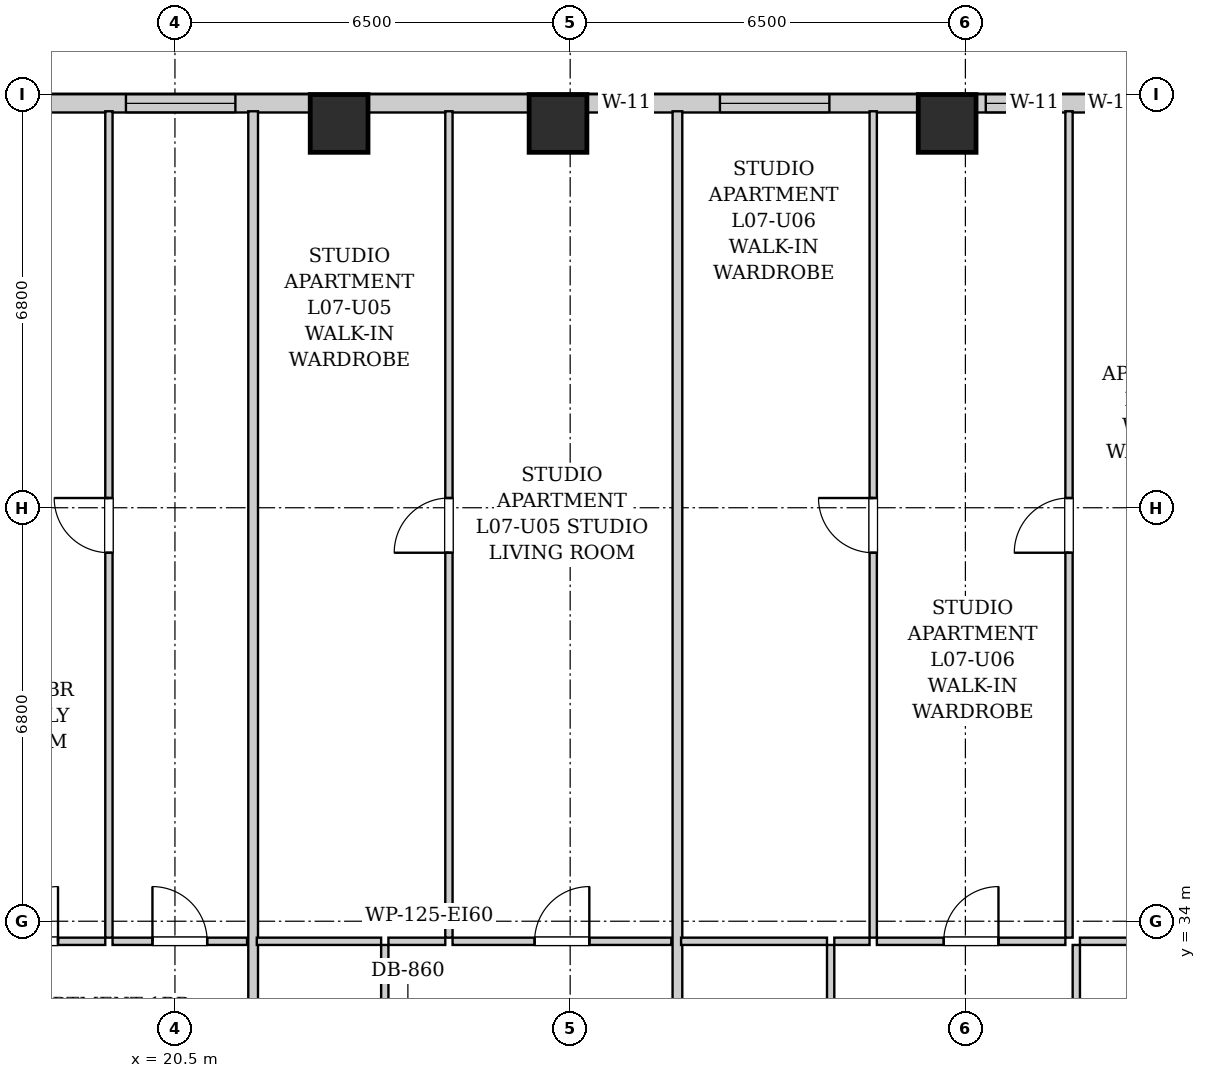
"""IFC4 building model, lengths in metres.
Left out: names, types, materials, properties, quantities, classifications, styles, units other than length and angle.
Written with IfcOpenShell. Run it as: python <this file> out.ifc"""

import sys

from ifc_helpers import new_model, si_unit, direction, frame, frame_2d, origin, origin_2d, place, context, subcontext, project, spatial, rectangle, extrude, element, fill, save


model = new_model("IFC4")
c1 = context("Model", 3, precision=1e-05, world=origin(), true_north=direction((0.0, 1.0)))
c2 = subcontext(c1, "Body", "Model", "MODEL_VIEW")
j1 = project(units=[si_unit("LENGTHUNIT", "METRE"), si_unit("PLANEANGLEUNIT", "RADIAN")], contexts=[c1])
p1 = place(None, origin())
s1 = spatial("IfcSite", under=j1, at=p1, CompositionType="ELEMENT")
p2 = place(p1, origin())
s2 = spatial("IfcBuilding", under=s1, at=p2, CompositionType="ELEMENT")
p3 = place(p2, frame((0.0, 0.0, 32.2)))
s3 = spatial("IfcBuildingStorey", under=s2, at=p3, CompositionType="ELEMENT", Elevation=32.2)
for number, where, z_axis, x_axis in (
    (1, (23.2, 47.12, 0.0), (0.0, 0.0, 1.0), (1.0, 0.0, 0.0)),
    (2, (26.8, 47.12, 0.0), (0.0, 0.0, 1.0), (1.0, 0.0, 0.0)),
    (3, (33.2, 47.12, 0.0), (0.0, 0.0, 1.0), (1.0, 0.0, 0.0)),
):
    element("IfcColumn", number, at=place(p3, frame(where, z_axis=z_axis, x_axis=x_axis)), inside=s3, PredefinedType="COLUMN", context=c2, shape_type="SweptSolid", body=[
        extrude(rectangle(XDim=0.95, YDim=0.95, at=origin_2d()), origin(), (0.0, 0.0, 1.0), 3.2),
    ])
p4 = place(p3, frame((10.0, 47.45, 0.0), z_axis=(0.0, 0.0, 1.0), x_axis=(1.0, 0.0, 0.0)))
e4 = element("IfcWall", 4, at=p4, inside=s3, PredefinedType="SOLIDWALL", context=c2, shape_type="SweptSolid", body=[
    extrude(rectangle(XDim=26.9, YDim=0.3, at=frame_2d((13.45, 0.0))), origin(), (0.0, 0.0, 1.0), 1.975),
])
p5 = place(p4, frame((5.815, 0.0, 0.55)))
e5 = element("IfcOpeningElement", 5, at=p5, cuts=e4, PredefinedType="OPENING", context=c2, shape_type="SweptSolid", body=[
    extrude(rectangle(XDim=1.35, YDim=1.2, at=frame_2d((0.675, 0.6))), frame((0.0, 0.16, 0.0), z_axis=(0.0, -1.0, 0.0), x_axis=(1.0, 0.0, 0.0)), (0.0, 0.0, 1.0), 0.32),
])
p6 = place(p4, frame((9.694, 0.0, 0.55)))
e6 = element("IfcOpeningElement", 6, at=p6, cuts=e4, PredefinedType="OPENING", context=c2, shape_type="SweptSolid", body=[
    extrude(rectangle(XDim=1.8, YDim=1.2, at=frame_2d((0.9, 0.6))), frame((0.0, 0.16, 0.0), z_axis=(0.0, -1.0, 0.0), x_axis=(1.0, 0.0, 0.0)), (0.0, 0.0, 1.0), 0.32),
])
p7 = place(p4, frame((17.5, 0.0, 0.55)))
e7 = element("IfcOpeningElement", 7, at=p7, cuts=e4, PredefinedType="OPENING", context=c2, shape_type="SweptSolid", body=[
    extrude(rectangle(XDim=0.85, YDim=1.2, at=frame_2d((0.425, 0.6))), frame((0.0, 0.16, 0.0), z_axis=(0.0, -1.0, 0.0), x_axis=(1.0, 0.0, 0.0)), (0.0, 0.0, 1.0), 0.32),
])
p8 = place(p4, frame((19.463, 0.0, 0.55)))
e8 = element("IfcOpeningElement", 8, at=p8, cuts=e4, PredefinedType="OPENING", context=c2, shape_type="SweptSolid", body=[
    extrude(rectangle(XDim=1.8, YDim=1.2, at=frame_2d((0.9, 0.6))), frame((0.0, 0.16, 0.0), z_axis=(0.0, -1.0, 0.0), x_axis=(1.0, 0.0, 0.0)), (0.0, 0.0, 1.0), 0.32),
])
p9 = place(p4, frame((23.835, 0.0, 0.55)))
e9 = element("IfcOpeningElement", 9, at=p9, cuts=e4, PredefinedType="OPENING", context=c2, shape_type="SweptSolid", body=[
    extrude(rectangle(XDim=0.85, YDim=1.2, at=frame_2d((0.425, 0.6))), frame((0.0, 0.16, 0.0), z_axis=(0.0, -1.0, 0.0), x_axis=(1.0, 0.0, 0.0)), (0.0, 0.0, 1.0), 0.32),
])
p10 = place(p4, frame((25.498, 0.0, 0.55)))
e10 = element("IfcOpeningElement", 10, at=p10, cuts=e4, PredefinedType="OPENING", context=c2, shape_type="SweptSolid", body=[
    extrude(rectangle(XDim=0.85, YDim=1.2, at=frame_2d((0.425, 0.6))), frame((0.0, 0.16, 0.0), z_axis=(0.0, -1.0, 0.0), x_axis=(1.0, 0.0, 0.0)), (0.0, 0.0, 1.0), 0.32),
])
p11 = place(p3, frame((16.9, 33.67, 0.0), z_axis=(0.0, 0.0, 1.0), x_axis=(1.0, 0.0, 0.0)))
e11 = element("IfcWall", 11, at=p11, inside=s3, PredefinedType="PARTITIONING", context=c2, shape_type="SweptSolid", body=[
    extrude(rectangle(XDim=2.454, YDim=0.12, at=frame_2d((1.227, 0.0))), origin(), (0.0, 0.0, 1.0), 2.94),
])
p12 = place(p11, frame((0.777, 0.0, 0.0)))
e12 = element("IfcOpeningElement", 12, at=p12, cuts=e11, PredefinedType="OPENING", context=c2, shape_type="SweptSolid", body=[
    extrude(rectangle(XDim=0.9, YDim=2.05, at=frame_2d((0.45, 1.025))), frame((0.0, 0.07, 0.0), z_axis=(0.0, -1.0, 0.0), x_axis=(1.0, 0.0, 0.0)), (0.0, 0.0, 1.0), 0.14),
])
p13 = place(p3, frame((19.474, 33.67, 0.0), z_axis=(0.0, 0.0, 1.0), x_axis=(1.0, 0.0, 0.0)))
e13 = element("IfcWall", 13, at=p13, inside=s3, PredefinedType="PARTITIONING", context=c2, shape_type="SweptSolid", body=[
    extrude(rectangle(XDim=2.212, YDim=0.12, at=frame_2d((1.106, 0.0))), origin(), (0.0, 0.0, 1.0), 2.94),
])
p14 = place(p13, frame((0.656, 0.0, 0.0)))
e14 = element("IfcOpeningElement", 14, at=p14, cuts=e13, PredefinedType="OPENING", context=c2, shape_type="SweptSolid", body=[
    extrude(rectangle(XDim=0.9, YDim=2.05, at=frame_2d((0.45, 1.025))), frame((0.0, 0.07, 0.0), z_axis=(0.0, -1.0, 0.0), x_axis=(1.0, 0.0, 0.0)), (0.0, 0.0, 1.0), 0.14),
])
p15 = place(p3, frame((19.414, 33.73, 0.0), z_axis=(0.0, 0.0, 1.0), x_axis=(0.0, 1.0, 0.0)))
e15 = element("IfcWall", 15, at=p15, inside=s3, PredefinedType="PARTITIONING", context=c2, shape_type="SweptSolid", body=[
    extrude(rectangle(XDim=13.59, YDim=0.12, at=frame_2d((6.795, 0.0))), origin(), (0.0, 0.0, 1.0), 2.94),
])
p16 = place(p15, frame((6.33, 0.0, 0.0)))
e16 = element("IfcOpeningElement", 16, at=p16, cuts=e15, PredefinedType="OPENING", context=c2, shape_type="SweptSolid", body=[
    extrude(rectangle(XDim=0.9, YDim=2.05, at=frame_2d((0.45, 1.025))), frame((0.0, 0.07, 0.0), z_axis=(0.0, -1.0, 0.0), x_axis=(1.0, 0.0, 0.0)), (0.0, 0.0, 1.0), 0.14),
])
p17 = place(p3, frame((21.786, 30.76, 0.0), z_axis=(0.0, 0.0, 1.0), x_axis=(0.0, 1.0, 0.0)))
e17 = element("IfcWall", 17, at=p17, inside=s3, PredefinedType="PARTITIONING", context=c2, shape_type="SweptSolid", body=[
    extrude(rectangle(XDim=16.56, YDim=0.16, at=frame_2d((8.28, 0.0))), origin(), (0.0, 0.0, 1.0), 2.94),
])
p18 = place(p3, frame((23.951, 30.76, 0.0), z_axis=(0.0, 0.0, 1.0), x_axis=(0.0, 1.0, 0.0)))
e18 = element("IfcWall", 18, at=p18, inside=s3, PredefinedType="PARTITIONING", context=c2, shape_type="SweptSolid", body=[
    extrude(rectangle(XDim=2.85, YDim=0.12, at=frame_2d((1.425, 0.0))), origin(), (0.0, 0.0, 1.0), 2.94),
])
p19 = place(p18, frame((0.995, 0.0, 0.0)))
e19 = element("IfcOpeningElement", 19, at=p19, cuts=e18, PredefinedType="OPENING", context=c2, shape_type="SweptSolid", body=[
    extrude(rectangle(XDim=0.86, YDim=2.05, at=frame_2d((0.43, 1.025))), frame((0.0, 0.07, 0.0), z_axis=(0.0, -1.0, 0.0), x_axis=(1.0, 0.0, 0.0)), (0.0, 0.0, 1.0), 0.14),
])
p20 = place(p3, frame((21.846, 33.67, 0.0), z_axis=(0.0, 0.0, 1.0), x_axis=(1.0, 0.0, 0.0)))
e20 = element("IfcWall", 20, at=p20, inside=s3, PredefinedType="PARTITIONING", context=c2, shape_type="SweptSolid", body=[
    extrude(rectangle(XDim=2.045, YDim=0.12, at=frame_2d((1.022, 0.0))), origin(), (0.0, 0.0, 1.0), 2.94),
])
p21 = place(p3, frame((24.011, 33.67, 0.0), z_axis=(0.0, 0.0, 1.0), x_axis=(1.0, 0.0, 0.0)))
e21 = element("IfcWall", 21, at=p21, inside=s3, PredefinedType="PARTITIONING", context=c2, shape_type="SweptSolid", body=[
    extrude(rectangle(XDim=0.935, YDim=0.12, at=frame_2d((0.468, 0.0))), origin(), (0.0, 0.0, 1.0), 2.94),
])
p22 = place(p3, frame((25.066, 33.67, 0.0), z_axis=(0.0, 0.0, 1.0), x_axis=(1.0, 0.0, 0.0)))
e22 = element("IfcWall", 22, at=p22, inside=s3, PredefinedType="PARTITIONING", context=c2, shape_type="SweptSolid", body=[
    extrude(rectangle(XDim=3.598, YDim=0.12, at=frame_2d((1.799, 0.0))), origin(), (0.0, 0.0, 1.0), 2.94),
])
p23 = place(p22, frame((1.349, 0.0, 0.0)))
e23 = element("IfcOpeningElement", 23, at=p23, cuts=e22, PredefinedType="OPENING", context=c2, shape_type="SweptSolid", body=[
    extrude(rectangle(XDim=0.9, YDim=2.05, at=frame_2d((0.45, 1.025))), frame((0.0, 0.07, 0.0), z_axis=(0.0, -1.0, 0.0), x_axis=(1.0, 0.0, 0.0)), (0.0, 0.0, 1.0), 0.14),
])
p24 = place(p3, frame((25.006, 33.73, 0.0), z_axis=(0.0, 0.0, 1.0), x_axis=(0.0, 1.0, 0.0)))
e24 = element("IfcWall", 24, at=p24, inside=s3, PredefinedType="PARTITIONING", context=c2, shape_type="SweptSolid", body=[
    extrude(rectangle(XDim=13.59, YDim=0.12, at=frame_2d((6.795, 0.0))), origin(), (0.0, 0.0, 1.0), 2.94),
])
p25 = place(p24, frame((6.33, 0.0, 0.0)))
e25 = element("IfcOpeningElement", 25, at=p25, cuts=e24, PredefinedType="OPENING", context=c2, shape_type="SweptSolid", body=[
    extrude(rectangle(XDim=0.9, YDim=2.05, at=frame_2d((0.45, 1.025))), frame((0.0, 0.07, 0.0), z_axis=(0.0, -1.0, 0.0), x_axis=(1.0, 0.0, 0.0)), (0.0, 0.0, 1.0), 0.14),
])
p26 = place(p3, frame((28.764, 30.76, 0.0), z_axis=(0.0, 0.0, 1.0), x_axis=(0.0, 1.0, 0.0)))
e26 = element("IfcWall", 26, at=p26, inside=s3, PredefinedType="PARTITIONING", context=c2, shape_type="SweptSolid", body=[
    extrude(rectangle(XDim=16.56, YDim=0.16, at=frame_2d((8.28, 0.0))), origin(), (0.0, 0.0, 1.0), 2.94),
])
p27 = place(p3, frame((31.284, 30.76, 0.0), z_axis=(0.0, 0.0, 1.0), x_axis=(0.0, 1.0, 0.0)))
e27 = element("IfcWall", 27, at=p27, inside=s3, PredefinedType="PARTITIONING", context=c2, shape_type="SweptSolid", body=[
    extrude(rectangle(XDim=2.85, YDim=0.12, at=frame_2d((1.425, 0.0))), origin(), (0.0, 0.0, 1.0), 2.94),
])
p28 = place(p27, frame((0.995, 0.0, 0.0)))
e28 = element("IfcOpeningElement", 28, at=p28, cuts=e27, PredefinedType="OPENING", context=c2, shape_type="SweptSolid", body=[
    extrude(rectangle(XDim=0.86, YDim=2.05, at=frame_2d((0.43, 1.025))), frame((0.0, 0.07, 0.0), z_axis=(0.0, -1.0, 0.0), x_axis=(1.0, 0.0, 0.0)), (0.0, 0.0, 1.0), 0.14),
])
p29 = place(p3, frame((28.824, 33.67, 0.0), z_axis=(0.0, 0.0, 1.0), x_axis=(1.0, 0.0, 0.0)))
e29 = element("IfcWall", 29, at=p29, inside=s3, PredefinedType="PARTITIONING", context=c2, shape_type="SweptSolid", body=[
    extrude(rectangle(XDim=2.4, YDim=0.12, at=frame_2d((1.2, 0.0))), origin(), (0.0, 0.0, 1.0), 2.94),
])
p30 = place(p3, frame((35.324, 30.76, 0.0), z_axis=(0.0, 0.0, 1.0), x_axis=(0.0, 1.0, 0.0)))
e30 = element("IfcWall", 30, at=p30, inside=s3, PredefinedType="PARTITIONING", context=c2, shape_type="SweptSolid", body=[
    extrude(rectangle(XDim=2.85, YDim=0.12, at=frame_2d((1.425, 0.0))), origin(), (0.0, 0.0, 1.0), 2.94),
])
p31 = place(p30, frame((0.975, 0.0, 0.0)))
e31 = element("IfcOpeningElement", 31, at=p31, cuts=e30, PredefinedType="OPENING", context=c2, shape_type="SweptSolid", body=[
    extrude(rectangle(XDim=0.9, YDim=2.05, at=frame_2d((0.45, 1.025))), frame((0.0, 0.07, 0.0), z_axis=(0.0, -1.0, 0.0), x_axis=(1.0, 0.0, 0.0)), (0.0, 0.0, 1.0), 0.14),
])
p32 = place(p3, frame((31.344, 33.67, 0.0), z_axis=(0.0, 0.0, 1.0), x_axis=(1.0, 0.0, 0.0)))
e32 = element("IfcWall", 32, at=p32, inside=s3, PredefinedType="PARTITIONING", context=c2, shape_type="SweptSolid", body=[
    extrude(rectangle(XDim=0.58, YDim=0.12, at=frame_2d((0.29, 0.0))), origin(), (0.0, 0.0, 1.0), 2.94),
])
p33 = place(p3, frame((32.044, 33.67, 0.0), z_axis=(0.0, 0.0, 1.0), x_axis=(1.0, 0.0, 0.0)))
e33 = element("IfcWall", 33, at=p33, inside=s3, PredefinedType="PARTITIONING", context=c2, shape_type="SweptSolid", body=[
    extrude(rectangle(XDim=3.1, YDim=0.12, at=frame_2d((1.55, 0.0))), origin(), (0.0, 0.0, 1.0), 2.94),
])
p34 = place(p33, frame((1.1, 0.0, 0.0)))
e34 = element("IfcOpeningElement", 34, at=p34, cuts=e33, PredefinedType="OPENING", context=c2, shape_type="SweptSolid", body=[
    extrude(rectangle(XDim=0.9, YDim=2.05, at=frame_2d((0.45, 1.025))), frame((0.0, 0.07, 0.0), z_axis=(0.0, -1.0, 0.0), x_axis=(1.0, 0.0, 0.0)), (0.0, 0.0, 1.0), 0.14),
])
p35 = place(p3, frame((35.384, 33.67, 0.0), z_axis=(0.0, 0.0, 1.0), x_axis=(1.0, 0.0, 0.0)))
e35 = element("IfcWall", 35, at=p35, inside=s3, PredefinedType="PARTITIONING", context=c2, shape_type="SweptSolid", body=[
    extrude(rectangle(XDim=2.98, YDim=0.12, at=frame_2d((1.49, 0.0))), origin(), (0.0, 0.0, 1.0), 2.94),
])
p36 = place(p35, frame((1.04, 0.0, 0.0)))
e36 = element("IfcOpeningElement", 36, at=p36, cuts=e35, PredefinedType="OPENING", context=c2, shape_type="SweptSolid", body=[
    extrude(rectangle(XDim=0.9, YDim=2.05, at=frame_2d((0.45, 1.025))), frame((0.0, 0.07, 0.0), z_axis=(0.0, -1.0, 0.0), x_axis=(1.0, 0.0, 0.0)), (0.0, 0.0, 1.0), 0.14),
])
p37 = place(p3, frame((31.984, 33.73, 0.0), z_axis=(0.0, 0.0, 1.0), x_axis=(0.0, 1.0, 0.0)))
e37 = element("IfcWall", 37, at=p37, inside=s3, PredefinedType="PARTITIONING", context=c2, shape_type="SweptSolid", body=[
    extrude(rectangle(XDim=13.59, YDim=0.12, at=frame_2d((6.795, 0.0))), origin(), (0.0, 0.0, 1.0), 2.94),
])
p38 = place(p37, frame((6.33, 0.0, 0.0)))
e38 = element("IfcOpeningElement", 38, at=p38, cuts=e37, PredefinedType="OPENING", context=c2, shape_type="SweptSolid", body=[
    extrude(rectangle(XDim=0.9, YDim=2.05, at=frame_2d((0.45, 1.025))), frame((0.0, 0.07, 0.0), z_axis=(0.0, -1.0, 0.0), x_axis=(1.0, 0.0, 0.0)), (0.0, 0.0, 1.0), 0.14),
])
p39 = place(p3, frame((35.204, 33.73, 0.0), z_axis=(0.0, 0.0, 1.0), x_axis=(0.0, 1.0, 0.0)))
e39 = element("IfcWall", 39, at=p39, inside=s3, PredefinedType="PARTITIONING", context=c2, shape_type="SweptSolid", body=[
    extrude(rectangle(XDim=13.59, YDim=0.12, at=frame_2d((6.795, 0.0))), origin(), (0.0, 0.0, 1.0), 2.94),
])
p40 = place(p39, frame((6.33, 0.0, 0.0)))
e40 = element("IfcOpeningElement", 40, at=p40, cuts=e39, PredefinedType="OPENING", context=c2, shape_type="SweptSolid", body=[
    extrude(rectangle(XDim=0.9, YDim=2.05, at=frame_2d((0.45, 1.025))), frame((0.0, 0.07, 0.0), z_axis=(0.0, -1.0, 0.0), x_axis=(1.0, 0.0, 0.0)), (0.0, 0.0, 1.0), 0.14),
])
p41 = place(p12, origin())
e41 = element("IfcDoor", 41, at=p41, inside=s3, OperationType="SINGLE_SWING_RIGHT", PredefinedType="DOOR", context=c2, shape_type="SweptSolid", body=[
    extrude(rectangle(XDim=0.9, YDim=2.05, at=frame_2d((0.45, 1.025))), frame((0.0, 0.025, 0.0), z_axis=(0.0, -1.0, 0.0), x_axis=(1.0, 0.0, 0.0)), (0.0, 0.0, 1.0), 0.05),
])
fill(e12, e41)
p42 = place(p14, origin())
e42 = element("IfcDoor", 42, at=p42, inside=s3, OperationType="SINGLE_SWING_LEFT", PredefinedType="DOOR", context=c2, shape_type="SweptSolid", body=[
    extrude(rectangle(XDim=0.9, YDim=2.05, at=frame_2d((0.45, 1.025))), frame((0.0, 0.025, 0.0), z_axis=(0.0, -1.0, 0.0), x_axis=(1.0, 0.0, 0.0)), (0.0, 0.0, 1.0), 0.05),
])
fill(e14, e42)
p43 = place(p16, origin())
e43 = element("IfcDoor", 43, at=p43, inside=s3, OperationType="SINGLE_SWING_RIGHT", PredefinedType="DOOR", context=c2, shape_type="SweptSolid", body=[
    extrude(rectangle(XDim=0.9, YDim=2.05, at=frame_2d((0.45, 1.025))), frame((0.0, 0.025, 0.0), z_axis=(0.0, -1.0, 0.0), x_axis=(1.0, 0.0, 0.0)), (0.0, 0.0, 1.0), 0.05),
])
fill(e16, e43)
p44 = place(p23, origin())
e44 = element("IfcDoor", 44, at=p44, inside=s3, OperationType="SINGLE_SWING_RIGHT", PredefinedType="DOOR", context=c2, shape_type="SweptSolid", body=[
    extrude(rectangle(XDim=0.9, YDim=2.05, at=frame_2d((0.45, 1.025))), frame((0.0, 0.025, 0.0), z_axis=(0.0, -1.0, 0.0), x_axis=(1.0, 0.0, 0.0)), (0.0, 0.0, 1.0), 0.05),
])
fill(e23, e44)
p45 = place(p25, origin())
e45 = element("IfcDoor", 45, at=p45, inside=s3, OperationType="SINGLE_SWING_LEFT", PredefinedType="DOOR", context=c2, shape_type="SweptSolid", body=[
    extrude(rectangle(XDim=0.9, YDim=2.05, at=frame_2d((0.45, 1.025))), frame((0.0, 0.025, 0.0), z_axis=(0.0, -1.0, 0.0), x_axis=(1.0, 0.0, 0.0)), (0.0, 0.0, 1.0), 0.05),
])
fill(e25, e45)
p46 = place(p34, origin())
e46 = element("IfcDoor", 46, at=p46, inside=s3, OperationType="SINGLE_SWING_RIGHT", PredefinedType="DOOR", context=c2, shape_type="SweptSolid", body=[
    extrude(rectangle(XDim=0.9, YDim=2.05, at=frame_2d((0.45, 1.025))), frame((0.0, 0.025, 0.0), z_axis=(0.0, -1.0, 0.0), x_axis=(1.0, 0.0, 0.0)), (0.0, 0.0, 1.0), 0.05),
])
fill(e34, e46)
p47 = place(p38, origin())
e47 = element("IfcDoor", 47, at=p47, inside=s3, OperationType="SINGLE_SWING_RIGHT", PredefinedType="DOOR", context=c2, shape_type="SweptSolid", body=[
    extrude(rectangle(XDim=0.9, YDim=2.05, at=frame_2d((0.45, 1.025))), frame((0.0, 0.025, 0.0), z_axis=(0.0, -1.0, 0.0), x_axis=(1.0, 0.0, 0.0)), (0.0, 0.0, 1.0), 0.05),
])
fill(e38, e47)
p48 = place(p40, origin())
e48 = element("IfcDoor", 48, at=p48, inside=s3, OperationType="SINGLE_SWING_LEFT", PredefinedType="DOOR", context=c2, shape_type="SweptSolid", body=[
    extrude(rectangle(XDim=0.9, YDim=2.05, at=frame_2d((0.45, 1.025))), frame((0.0, 0.025, 0.0), z_axis=(0.0, -1.0, 0.0), x_axis=(1.0, 0.0, 0.0)), (0.0, 0.0, 1.0), 0.05),
])
fill(e40, e48)
p49 = place(p6, origin())
e49 = element("IfcWindow", 49, at=p49, inside=s3, PartitioningType="DOUBLE_PANEL_VERTICAL", PredefinedType="WINDOW", context=c2, shape_type="SweptSolid", body=[
    extrude(rectangle(XDim=1.8, YDim=1.2, at=frame_2d((0.9, 0.6))), frame((0.0, 0.03, 0.0), z_axis=(0.0, -1.0, 0.0), x_axis=(1.0, 0.0, 0.0)), (0.0, 0.0, 1.0), 0.06),
])
fill(e6, e49)
p50 = place(p7, origin())
e50 = element("IfcWindow", 50, at=p50, inside=s3, PartitioningType="SINGLE_PANEL", PredefinedType="WINDOW", context=c2, shape_type="SweptSolid", body=[
    extrude(rectangle(XDim=0.85, YDim=1.2, at=frame_2d((0.425, 0.6))), frame((0.0, 0.03, 0.0), z_axis=(0.0, -1.0, 0.0), x_axis=(1.0, 0.0, 0.0)), (0.0, 0.0, 1.0), 0.06),
])
fill(e7, e50)
p51 = place(p8, origin())
e51 = element("IfcWindow", 51, at=p51, inside=s3, PartitioningType="DOUBLE_PANEL_VERTICAL", PredefinedType="WINDOW", context=c2, shape_type="SweptSolid", body=[
    extrude(rectangle(XDim=1.8, YDim=1.2, at=frame_2d((0.9, 0.6))), frame((0.0, 0.03, 0.0), z_axis=(0.0, -1.0, 0.0), x_axis=(1.0, 0.0, 0.0)), (0.0, 0.0, 1.0), 0.06),
])
fill(e8, e51)
p52 = place(p9, origin())
e52 = element("IfcWindow", 52, at=p52, inside=s3, PartitioningType="SINGLE_PANEL", PredefinedType="WINDOW", context=c2, shape_type="SweptSolid", body=[
    extrude(rectangle(XDim=0.85, YDim=1.2, at=frame_2d((0.425, 0.6))), frame((0.0, 0.03, 0.0), z_axis=(0.0, -1.0, 0.0), x_axis=(1.0, 0.0, 0.0)), (0.0, 0.0, 1.0), 0.06),
])
fill(e9, e52)
p53 = place(p10, origin())
e53 = element("IfcWindow", 53, at=p53, inside=s3, PartitioningType="SINGLE_PANEL", PredefinedType="WINDOW", context=c2, shape_type="SweptSolid", body=[
    extrude(rectangle(XDim=0.85, YDim=1.2, at=frame_2d((0.425, 0.6))), frame((0.0, 0.03, 0.0), z_axis=(0.0, -1.0, 0.0), x_axis=(1.0, 0.0, 0.0)), (0.0, 0.0, 1.0), 0.06),
])
fill(e10, e53)
save(model, sys.argv[1])
